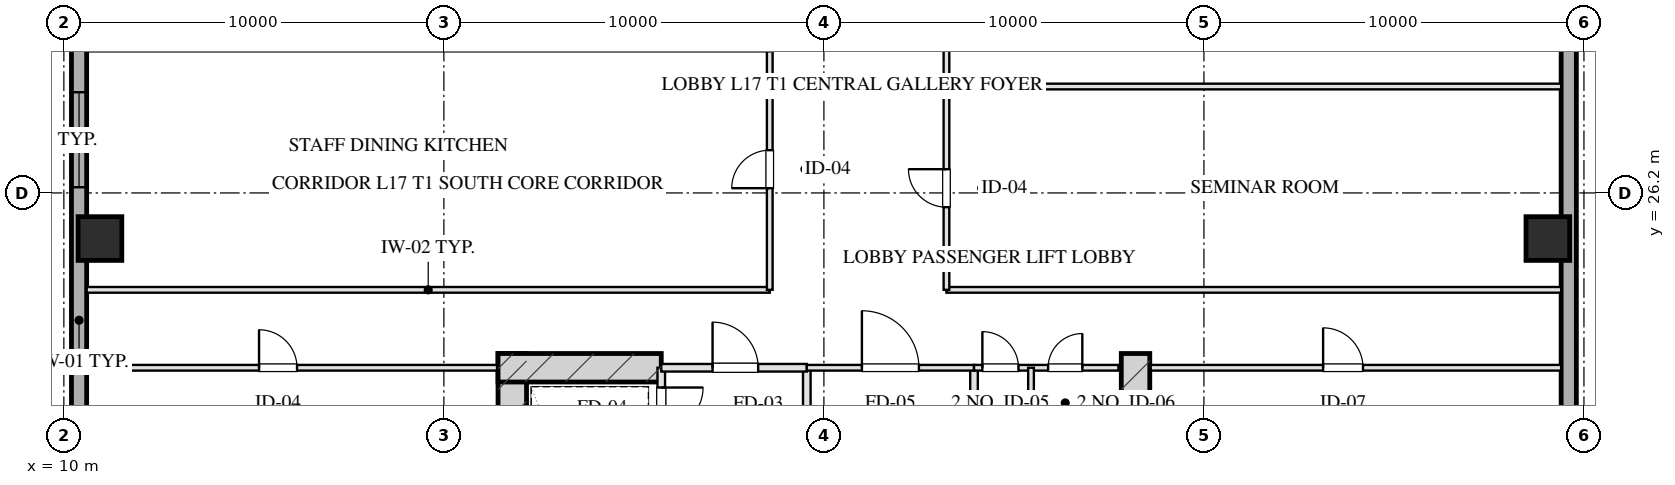
"""IFC4 building model, lengths in metres.
Left out: names, types, materials, properties, quantities, classifications, styles, units other than length and angle.
Written with IfcOpenShell. Run it as: python <this file> out.ifc"""

import sys

from ifc_helpers import new_model, si_unit, direction, frame, frame_2d, origin, origin_2d, place, context, subcontext, project, spatial, rectangle, hollow_rectangle, extrude, element, fill, save


model = new_model("IFC4")
c1 = context("Model", 3, precision=1e-05, world=origin(), true_north=direction((0.0, 1.0)))
c2 = subcontext(c1, "Body", "Model", "MODEL_VIEW")
j1 = project(units=[si_unit("LENGTHUNIT", "METRE"), si_unit("PLANEANGLEUNIT", "RADIAN")], contexts=[c1])
p1 = place(None, origin())
s1 = spatial("IfcSite", under=j1, at=p1, CompositionType="ELEMENT")
p2 = place(p1, origin())
s2 = spatial("IfcBuilding", under=s1, at=p2, CompositionType="ELEMENT")
p3 = place(p2, frame((0.0, 0.0, 71.3)))
s3 = spatial("IfcBuildingStorey", under=s2, at=p3, CompositionType="ELEMENT", Elevation=71.3)
for number, where, z_axis, x_axis in (
    (1, (21.8, 21.975, 0.0), (0.0, 0.0, 1.0), (0.0, -1.0, 0.0)),
    (2, (38.2, 21.975, 0.0), (0.0, 0.0, 1.0), (0.0, -1.0, 0.0)),
):
    element("IfcWall", number, at=place(p3, frame(where, z_axis=z_axis, x_axis=x_axis)), inside=s3, PredefinedType="SHEAR", context=c2, shape_type="SweptSolid", body=[
        extrude(rectangle(XDim=9.63, YDim=0.75, at=frame_2d((4.815, 0.0))), origin(), (0.0, 0.0, 1.0), 3.45),
    ])
p4 = place(p3, frame((21.425, 21.6, 0.0), z_axis=(0.0, 0.0, 1.0), x_axis=(1.0, 0.0, 0.0)))
e3 = element("IfcWall", 3, at=p4, inside=s3, PredefinedType="SHEAR", context=c2, shape_type="SweptSolid", body=[
    extrude(rectangle(XDim=4.295, YDim=0.75, at=frame_2d((2.147, 0.0))), origin(), (0.0, 0.0, 1.0), 3.45),
])
for number, where, z_axis, x_axis in (
    (4, (10.95, 25.0, 0.0), (0.0, 0.0, 1.0), (1.0, 0.0, 0.0)),
    (5, (49.05, 25.0, 0.0), (0.0, 0.0, 1.0), (1.0, 0.0, 0.0)),
):
    element("IfcColumn", number, at=place(p3, frame(where, z_axis=z_axis, x_axis=x_axis)), inside=s3, PredefinedType="COLUMN", context=c2, shape_type="SweptSolid", body=[
        extrude(hollow_rectangle(XDim=1.15, YDim=1.15, WallThickness=0.04, at=origin_2d()), origin(), (0.0, 0.0, 1.0), 3.451),
    ])
p5 = place(p3, frame((10.4, 7.2, 0.0), z_axis=(0.0, 0.0, 1.0), x_axis=(0.0, 1.0, 0.0)))
e6 = element("IfcWall", 6, at=p5, inside=s3, PredefinedType="SOLIDWALL", context=c2, shape_type="SweptSolid", body=[
    extrude(rectangle(XDim=53.6, YDim=0.4, at=frame_2d((26.8, 0.0))), origin(), (0.0, 0.0, 1.0), 2.61),
])
p6 = place(p5, frame((19.15, 0.0, 0.75)))
e7 = element("IfcOpeningElement", 7, at=p6, cuts=e6, PredefinedType="OPENING", context=c2, shape_type="SweptSolid", body=[
    extrude(rectangle(XDim=2.5, YDim=1.46, at=frame_2d((1.25, 0.73))), frame((0.0, 0.21, 0.0), z_axis=(0.0, -1.0, 0.0), x_axis=(1.0, 0.0, 0.0)), (0.0, 0.0, 1.0), 0.42),
])
p7 = place(p5, frame((32.05, 0.0, 0.0)))
e8 = element("IfcOpeningElement", 8, at=p7, cuts=e6, PredefinedType="OPENING", context=c2, shape_type="SweptSolid", body=[
    extrude(rectangle(XDim=1.1, YDim=2.15, at=frame_2d((0.55, 1.075))), frame((0.0, 0.21, 0.0), z_axis=(0.0, -1.0, 0.0), x_axis=(1.0, 0.0, 0.0)), (0.0, 0.0, 1.0), 0.42),
])
p8 = place(p3, frame((49.6, 60.8, 0.0), z_axis=(0.0, 0.0, 1.0), x_axis=(0.0, -1.0, 0.0)))
e9 = element("IfcWall", 9, at=p8, inside=s3, PredefinedType="SOLIDWALL", context=c2, shape_type="SweptSolid", body=[
    extrude(rectangle(XDim=53.6, YDim=0.4, at=frame_2d((26.8, 0.0))), origin(), (0.0, 0.0, 1.0), 2.61),
])
p9 = place(p8, frame((28.15, 0.0, 0.75)))
e10 = element("IfcOpeningElement", 10, at=p9, cuts=e9, PredefinedType="OPENING", context=c2, shape_type="SweptSolid", body=[
    extrude(rectangle(XDim=2.5, YDim=1.46, at=frame_2d((1.25, 0.73))), frame((0.0, 0.21, 0.0), z_axis=(0.0, -1.0, 0.0), x_axis=(1.0, 0.0, 0.0)), (0.0, 0.0, 1.0), 0.42),
])
p10 = place(p8, frame((23.15, 0.0, 0.0)))
e11 = element("IfcOpeningElement", 11, at=p10, cuts=e9, PredefinedType="OPENING", context=c2, shape_type="SweptSolid", body=[
    extrude(rectangle(XDim=1.1, YDim=2.15, at=frame_2d((0.55, 1.075))), frame((0.0, 0.21, 0.0), z_axis=(0.0, -1.0, 0.0), x_axis=(1.0, 0.0, 0.0)), (0.0, 0.0, 1.0), 0.42),
])
p11 = place(p3, frame((25.72, 21.6, 0.0), z_axis=(0.0, 0.0, 1.0), x_axis=(0.0, -1.0, 0.0)))
e12 = element("IfcWall", 12, at=p11, inside=s3, PredefinedType="PARTITIONING", context=c2, shape_type="SweptSolid", body=[
    extrude(rectangle(XDim=1.9, YDim=0.2, at=frame_2d((0.95, 0.0))), origin(), (0.0, 0.0, 1.0), 3.175),
])
p12 = place(p11, frame((0.52, 0.0, 0.0)))
e13 = element("IfcOpeningElement", 13, at=p12, cuts=e12, PredefinedType="OPENING", context=c2, shape_type="SweptSolid", body=[
    extrude(rectangle(XDim=1.1, YDim=2.05, at=frame_2d((0.55, 1.025))), frame((0.0, 0.11, 0.0), z_axis=(0.0, -1.0, 0.0), x_axis=(1.0, 0.0, 0.0)), (0.0, 0.0, 1.0), 0.22),
])
p13 = place(p3, frame((29.55, 21.6, 0.0), z_axis=(0.0, 0.0, 1.0), x_axis=(0.0, -1.0, 0.0)))
e14 = element("IfcWall", 14, at=p13, inside=s3, PredefinedType="PARTITIONING", context=c2, shape_type="SweptSolid", body=[
    extrude(rectangle(XDim=8.43, YDim=0.2, at=frame_2d((4.215, 0.0))), origin(), (0.0, 0.0, 1.0), 3.175),
])
p14 = place(p3, frame((25.72, 21.6, 0.0), z_axis=(0.0, 0.0, 1.0), x_axis=(1.0, 0.0, 0.0)))
e15 = element("IfcWall", 15, at=p14, inside=s3, PredefinedType="PARTITIONING", context=c2, shape_type="SweptSolid", body=[
    extrude(rectangle(XDim=3.83, YDim=0.2, at=frame_2d((1.915, 0.0))), origin(), (0.0, 0.0, 1.0), 3.175),
])
p15 = place(p14, frame((1.35, 0.0, 0.0)))
e16 = element("IfcOpeningElement", 16, at=p15, cuts=e15, PredefinedType="OPENING", context=c2, shape_type="SweptSolid", body=[
    extrude(rectangle(XDim=1.2, YDim=2.05, at=frame_2d((0.6, 1.025))), frame((0.0, 0.11, 0.0), z_axis=(0.0, -1.0, 0.0), x_axis=(1.0, 0.0, 0.0)), (0.0, 0.0, 1.0), 0.22),
])
p16 = place(p3, frame((33.95, 21.6, 0.0), z_axis=(0.0, 0.0, 1.0), x_axis=(0.0, -1.0, 0.0)))
e17 = element("IfcWall", 17, at=p16, inside=s3, PredefinedType="PARTITIONING", context=c2, shape_type="SweptSolid", body=[
    extrude(rectangle(XDim=8.43, YDim=0.2, at=frame_2d((4.215, 0.0))), origin(), (0.0, 0.0, 1.0), 3.175),
])
p17 = place(p3, frame((29.55, 21.6, 0.0), z_axis=(0.0, 0.0, 1.0), x_axis=(1.0, 0.0, 0.0)))
e18 = element("IfcWall", 18, at=p17, inside=s3, PredefinedType="PARTITIONING", context=c2, shape_type="SweptSolid", body=[
    extrude(rectangle(XDim=4.4, YDim=0.15, at=frame_2d((2.2, 0.0))), origin(), (0.0, 0.0, 1.0), 3.175),
])
p18 = place(p17, frame((1.45, 0.0, 0.0)))
e19 = element("IfcOpeningElement", 19, at=p18, cuts=e18, PredefinedType="OPENING", context=c2, shape_type="SweptSolid", body=[
    extrude(rectangle(XDim=1.5, YDim=2.05, at=frame_2d((0.75, 1.025))), frame((0.0, 0.085, 0.0), z_axis=(0.0, -1.0, 0.0), x_axis=(1.0, 0.0, 0.0)), (0.0, 0.0, 1.0), 0.17),
])
p19 = place(p3, frame((33.95, 21.6, 0.0), z_axis=(0.0, 0.0, 1.0), x_axis=(1.0, 0.0, 0.0)))
e20 = element("IfcWall", 20, at=p19, inside=s3, PredefinedType="PARTITIONING", context=c2, shape_type="SweptSolid", body=[
    extrude(rectangle(XDim=3.8, YDim=0.15, at=frame_2d((1.9, 0.0))), origin(), (0.0, 0.0, 1.0), 3.175),
])
p20 = place(p19, frame((0.22, 0.0, 0.0)))
e21 = element("IfcOpeningElement", 21, at=p20, cuts=e20, PredefinedType="OPENING", context=c2, shape_type="SweptSolid", body=[
    extrude(rectangle(XDim=0.95, YDim=2.05, at=frame_2d((0.475, 1.025))), frame((0.0, 0.085, 0.0), z_axis=(0.0, -1.0, 0.0), x_axis=(1.0, 0.0, 0.0)), (0.0, 0.0, 1.0), 0.17),
])
p21 = place(p19, frame((1.95, 0.0, 0.0)))
e22 = element("IfcOpeningElement", 22, at=p21, cuts=e20, PredefinedType="OPENING", context=c2, shape_type="SweptSolid", body=[
    extrude(rectangle(XDim=0.9, YDim=2.05, at=frame_2d((0.45, 1.025))), frame((0.0, 0.085, 0.0), z_axis=(0.0, -1.0, 0.0), x_axis=(1.0, 0.0, 0.0)), (0.0, 0.0, 1.0), 0.17),
])
p22 = place(p3, frame((35.45, 21.6, 0.0), z_axis=(0.0, 0.0, 1.0), x_axis=(0.0, -1.0, 0.0)))
e23 = element("IfcWall", 23, at=p22, inside=s3, PredefinedType="PARTITIONING", context=c2, shape_type="SweptSolid", body=[
    extrude(rectangle(XDim=8.43, YDim=0.15, at=frame_2d((4.215, 0.0))), origin(), (0.0, 0.0, 1.0), 2.815),
])
p23 = place(p22, frame((2.55, 0.0, 0.0)))
e24 = element("IfcOpeningElement", 24, at=p23, cuts=e23, PredefinedType="OPENING", context=c2, shape_type="SweptSolid", body=[
    extrude(rectangle(XDim=0.95, YDim=2.05, at=frame_2d((0.475, 1.025))), frame((0.0, 0.085, 0.0), z_axis=(0.0, -1.0, 0.0), x_axis=(1.0, 0.0, 0.0)), (0.0, 0.0, 1.0), 0.17),
])
p24 = place(p22, frame((5.6, 0.0, 0.0)))
e25 = element("IfcOpeningElement", 25, at=p24, cuts=e23, PredefinedType="OPENING", context=c2, shape_type="SweptSolid", body=[
    extrude(rectangle(XDim=0.9, YDim=2.05, at=frame_2d((0.45, 1.025))), frame((0.0, 0.085, 0.0), z_axis=(0.0, -1.0, 0.0), x_axis=(1.0, 0.0, 0.0)), (0.0, 0.0, 1.0), 0.17),
])
p25 = place(p3, frame((10.6, 21.6, 0.0), z_axis=(0.0, 0.0, 1.0), x_axis=(1.0, 0.0, 0.0)))
e26 = element("IfcWall", 26, at=p25, inside=s3, PredefinedType="PARTITIONING", context=c2, shape_type="SweptSolid", body=[
    extrude(rectangle(XDim=10.8, YDim=0.15, at=frame_2d((5.4, 0.0))), origin(), (0.0, 0.0, 1.0), 3.175),
])
p26 = place(p25, frame((4.536, 0.0, 0.0)))
e27 = element("IfcOpeningElement", 27, at=p26, cuts=e26, PredefinedType="OPENING", context=c2, shape_type="SweptSolid", body=[
    extrude(rectangle(XDim=1.0, YDim=2.05, at=frame_2d((0.5, 1.025))), frame((0.0, 0.085, 0.0), z_axis=(0.0, -1.0, 0.0), x_axis=(1.0, 0.0, 0.0)), (0.0, 0.0, 1.0), 0.17),
])
p27 = place(p3, frame((38.6, 21.6, 0.0), z_axis=(0.0, 0.0, 1.0), x_axis=(1.0, 0.0, 0.0)))
e28 = element("IfcWall", 28, at=p27, inside=s3, PredefinedType="PARTITIONING", context=c2, shape_type="SweptSolid", body=[
    extrude(rectangle(XDim=10.8, YDim=0.15, at=frame_2d((5.4, 0.0))), origin(), (0.0, 0.0, 1.0), 3.175),
])
p28 = place(p27, frame((4.536, 0.0, 0.0)))
e29 = element("IfcOpeningElement", 29, at=p28, cuts=e28, PredefinedType="OPENING", context=c2, shape_type="SweptSolid", body=[
    extrude(rectangle(XDim=1.05, YDim=2.05, at=frame_2d((0.525, 1.025))), frame((0.0, 0.085, 0.0), z_axis=(0.0, -1.0, 0.0), x_axis=(1.0, 0.0, 0.0)), (0.0, 0.0, 1.0), 0.17),
])
p29 = place(p3, frame((10.6, 23.65, 0.0), z_axis=(0.0, 0.0, 1.0), x_axis=(1.0, 0.0, 0.0)))
e30 = element("IfcWall", 30, at=p29, inside=s3, PredefinedType="PARTITIONING", context=c2, shape_type="SweptSolid", body=[
    extrude(rectangle(XDim=17.975, YDim=0.15, at=frame_2d((8.987, 0.0))), origin(), (0.0, 0.0, 1.0), 3.175),
])
p30 = place(p3, frame((33.225, 23.65, 0.0), z_axis=(0.0, 0.0, 1.0), x_axis=(1.0, 0.0, 0.0)))
e31 = element("IfcWall", 31, at=p30, inside=s3, PredefinedType="PARTITIONING", context=c2, shape_type="SweptSolid", body=[
    extrude(rectangle(XDim=16.175, YDim=0.15, at=frame_2d((8.087, 0.0))), origin(), (0.0, 0.0, 1.0), 3.175),
])
p31 = place(p3, frame((28.575, 23.65, 0.0), z_axis=(0.0, 0.0, 1.0), x_axis=(0.0, 1.0, 0.0)))
e32 = element("IfcWall", 32, at=p31, inside=s3, PredefinedType="PARTITIONING", context=c2, shape_type="SweptSolid", body=[
    extrude(rectangle(XDim=20.7, YDim=0.15, at=frame_2d((10.35, 0.0))), origin(), (0.0, 0.0, 1.0), 3.175),
])
p32 = place(p31, frame((2.675, 0.0, 0.0)))
e33 = element("IfcOpeningElement", 33, at=p32, cuts=e32, PredefinedType="OPENING", context=c2, shape_type="SweptSolid", body=[
    extrude(rectangle(XDim=1.0, YDim=2.05, at=frame_2d((0.5, 1.025))), frame((0.0, 0.085, 0.0), z_axis=(0.0, -1.0, 0.0), x_axis=(1.0, 0.0, 0.0)), (0.0, 0.0, 1.0), 0.17),
])
p33 = place(p31, frame((9.85, 0.0, 0.0)))
e34 = element("IfcOpeningElement", 34, at=p33, cuts=e32, PredefinedType="OPENING", context=c2, shape_type="SweptSolid", body=[
    extrude(rectangle(XDim=1.0, YDim=2.05, at=frame_2d((0.5, 1.025))), frame((0.0, 0.085, 0.0), z_axis=(0.0, -1.0, 0.0), x_axis=(1.0, 0.0, 0.0)), (0.0, 0.0, 1.0), 0.17),
])
p34 = place(p31, frame((17.025, 0.0, 0.0)))
e35 = element("IfcOpeningElement", 35, at=p34, cuts=e32, PredefinedType="OPENING", context=c2, shape_type="SweptSolid", body=[
    extrude(rectangle(XDim=1.0, YDim=2.05, at=frame_2d((0.5, 1.025))), frame((0.0, 0.085, 0.0), z_axis=(0.0, -1.0, 0.0), x_axis=(1.0, 0.0, 0.0)), (0.0, 0.0, 1.0), 0.17),
])
p35 = place(p3, frame((33.225, 23.65, 0.0), z_axis=(0.0, 0.0, 1.0), x_axis=(0.0, 1.0, 0.0)))
e36 = element("IfcWall", 36, at=p35, inside=s3, PredefinedType="PARTITIONING", context=c2, shape_type="SweptSolid", body=[
    extrude(rectangle(XDim=20.7, YDim=0.15, at=frame_2d((10.35, 0.0))), origin(), (0.0, 0.0, 1.0), 3.175),
])
p36 = place(p35, frame((2.175, 0.0, 0.0)))
e37 = element("IfcOpeningElement", 37, at=p36, cuts=e36, PredefinedType="OPENING", context=c2, shape_type="SweptSolid", body=[
    extrude(rectangle(XDim=1.0, YDim=2.05, at=frame_2d((0.5, 1.025))), frame((0.0, 0.085, 0.0), z_axis=(0.0, -1.0, 0.0), x_axis=(1.0, 0.0, 0.0)), (0.0, 0.0, 1.0), 0.17),
])
p37 = place(p35, frame((7.69, 0.0, 0.0)))
e38 = element("IfcOpeningElement", 38, at=p37, cuts=e36, PredefinedType="OPENING", context=c2, shape_type="SweptSolid", body=[
    extrude(rectangle(XDim=1.05, YDim=2.05, at=frame_2d((0.525, 1.025))), frame((0.0, 0.085, 0.0), z_axis=(0.0, -1.0, 0.0), x_axis=(1.0, 0.0, 0.0)), (0.0, 0.0, 1.0), 0.17),
])
p38 = place(p35, frame((12.69, 0.0, 0.0)))
e39 = element("IfcOpeningElement", 39, at=p38, cuts=e36, PredefinedType="OPENING", context=c2, shape_type="SweptSolid", body=[
    extrude(rectangle(XDim=1.0, YDim=2.05, at=frame_2d((0.5, 1.025))), frame((0.0, 0.085, 0.0), z_axis=(0.0, -1.0, 0.0), x_axis=(1.0, 0.0, 0.0)), (0.0, 0.0, 1.0), 0.17),
])
p39 = place(p35, frame((17.525, 0.0, 0.0)))
e40 = element("IfcOpeningElement", 40, at=p39, cuts=e36, PredefinedType="OPENING", context=c2, shape_type="SweptSolid", body=[
    extrude(rectangle(XDim=1.0, YDim=2.05, at=frame_2d((0.5, 1.025))), frame((0.0, 0.085, 0.0), z_axis=(0.0, -1.0, 0.0), x_axis=(1.0, 0.0, 0.0)), (0.0, 0.0, 1.0), 0.17),
])
p40 = place(p3, frame((33.225, 29.0, 0.0), z_axis=(0.0, 0.0, 1.0), x_axis=(1.0, 0.0, 0.0)))
e41 = element("IfcWall", 41, at=p40, inside=s3, PredefinedType="PARTITIONING", context=c2, shape_type="SweptSolid", body=[
    extrude(rectangle(XDim=16.175, YDim=0.15, at=frame_2d((8.087, 0.0))), origin(), (0.0, 0.0, 1.0), 3.175),
])
p41 = place(p6, origin())
e42 = element("IfcWindow", 42, at=p41, inside=s3, PartitioningType="TRIPLE_PANEL_VERTICAL", PredefinedType="WINDOW", context=c2, shape_type="SweptSolid", body=[
    extrude(rectangle(XDim=2.5, YDim=1.46, at=frame_2d((1.25, 0.73))), frame((0.0, 0.03, 0.0), z_axis=(0.0, -1.0, 0.0), x_axis=(1.0, 0.0, 0.0)), (0.0, 0.0, 1.0), 0.06),
])
fill(e7, e42)
p42 = place(p12, origin())
e43 = element("IfcDoor", 43, at=p42, inside=s3, OperationType="SINGLE_SWING_LEFT", PredefinedType="DOOR", context=c2, shape_type="SweptSolid", body=[
    extrude(rectangle(XDim=1.1, YDim=2.05, at=frame_2d((0.55, 1.025))), frame((0.0, 0.025, 0.0), z_axis=(0.0, -1.0, 0.0), x_axis=(1.0, 0.0, 0.0)), (0.0, 0.0, 1.0), 0.05),
])
fill(e13, e43)
p43 = place(p15, origin())
e44 = element("IfcDoor", 44, at=p43, inside=s3, OperationType="SINGLE_SWING_LEFT", PredefinedType="DOOR", context=c2, shape_type="SweptSolid", body=[
    extrude(rectangle(XDim=1.2, YDim=2.05, at=frame_2d((0.6, 1.025))), frame((0.0, 0.025, 0.0), z_axis=(0.0, -1.0, 0.0), x_axis=(1.0, 0.0, 0.0)), (0.0, 0.0, 1.0), 0.05),
])
fill(e16, e44)
p44 = place(p18, origin())
e45 = element("IfcDoor", 45, at=p44, inside=s3, OperationType="SINGLE_SWING_LEFT", PredefinedType="DOOR", context=c2, shape_type="SweptSolid", body=[
    extrude(rectangle(XDim=1.5, YDim=2.05, at=frame_2d((0.75, 1.025))), frame((0.0, 0.025, 0.0), z_axis=(0.0, -1.0, 0.0), x_axis=(1.0, 0.0, 0.0)), (0.0, 0.0, 1.0), 0.05),
])
fill(e19, e45)
p45 = place(p20, origin())
e46 = element("IfcDoor", 46, at=p45, inside=s3, OperationType="SINGLE_SWING_LEFT", PredefinedType="DOOR", context=c2, shape_type="SweptSolid", body=[
    extrude(rectangle(XDim=0.95, YDim=2.05, at=frame_2d((0.475, 1.025))), frame((0.0, 0.025, 0.0), z_axis=(0.0, -1.0, 0.0), x_axis=(1.0, 0.0, 0.0)), (0.0, 0.0, 1.0), 0.05),
])
fill(e21, e46)
p46 = place(p21, origin())
e47 = element("IfcDoor", 47, at=p46, inside=s3, OperationType="SINGLE_SWING_RIGHT", PredefinedType="DOOR", context=c2, shape_type="SweptSolid", body=[
    extrude(rectangle(XDim=0.9, YDim=2.05, at=frame_2d((0.45, 1.025))), frame((0.0, 0.025, 0.0), z_axis=(0.0, -1.0, 0.0), x_axis=(1.0, 0.0, 0.0)), (0.0, 0.0, 1.0), 0.05),
])
fill(e22, e47)
p47 = place(p26, origin())
e48 = element("IfcDoor", 48, at=p47, inside=s3, OperationType="SINGLE_SWING_LEFT", PredefinedType="DOOR", context=c2, shape_type="SweptSolid", body=[
    extrude(rectangle(XDim=1.0, YDim=2.05, at=frame_2d((0.5, 1.025))), frame((0.0, 0.025, 0.0), z_axis=(0.0, -1.0, 0.0), x_axis=(1.0, 0.0, 0.0)), (0.0, 0.0, 1.0), 0.05),
])
fill(e27, e48)
p48 = place(p28, origin())
e49 = element("IfcDoor", 49, at=p48, inside=s3, OperationType="SINGLE_SWING_LEFT", PredefinedType="DOOR", context=c2, shape_type="SweptSolid", body=[
    extrude(rectangle(XDim=1.05, YDim=2.05, at=frame_2d((0.525, 1.025))), frame((0.0, 0.025, 0.0), z_axis=(0.0, -1.0, 0.0), x_axis=(1.0, 0.0, 0.0)), (0.0, 0.0, 1.0), 0.05),
])
fill(e29, e49)
p49 = place(p32, origin())
e50 = element("IfcDoor", 50, at=p49, inside=s3, OperationType="SINGLE_SWING_LEFT", PredefinedType="DOOR", context=c2, shape_type="SweptSolid", body=[
    extrude(rectangle(XDim=1.0, YDim=2.05, at=frame_2d((0.5, 1.025))), frame((0.0, 0.025, 0.0), z_axis=(0.0, -1.0, 0.0), x_axis=(1.0, 0.0, 0.0)), (0.0, 0.0, 1.0), 0.05),
])
fill(e33, e50)
p50 = place(p36, origin())
e51 = element("IfcDoor", 51, at=p50, inside=s3, OperationType="SINGLE_SWING_RIGHT", PredefinedType="DOOR", context=c2, shape_type="SweptSolid", body=[
    extrude(rectangle(XDim=1.0, YDim=2.05, at=frame_2d((0.5, 1.025))), frame((0.0, 0.025, 0.0), z_axis=(0.0, -1.0, 0.0), x_axis=(1.0, 0.0, 0.0)), (0.0, 0.0, 1.0), 0.05),
])
fill(e37, e51)
save(model, sys.argv[1])
